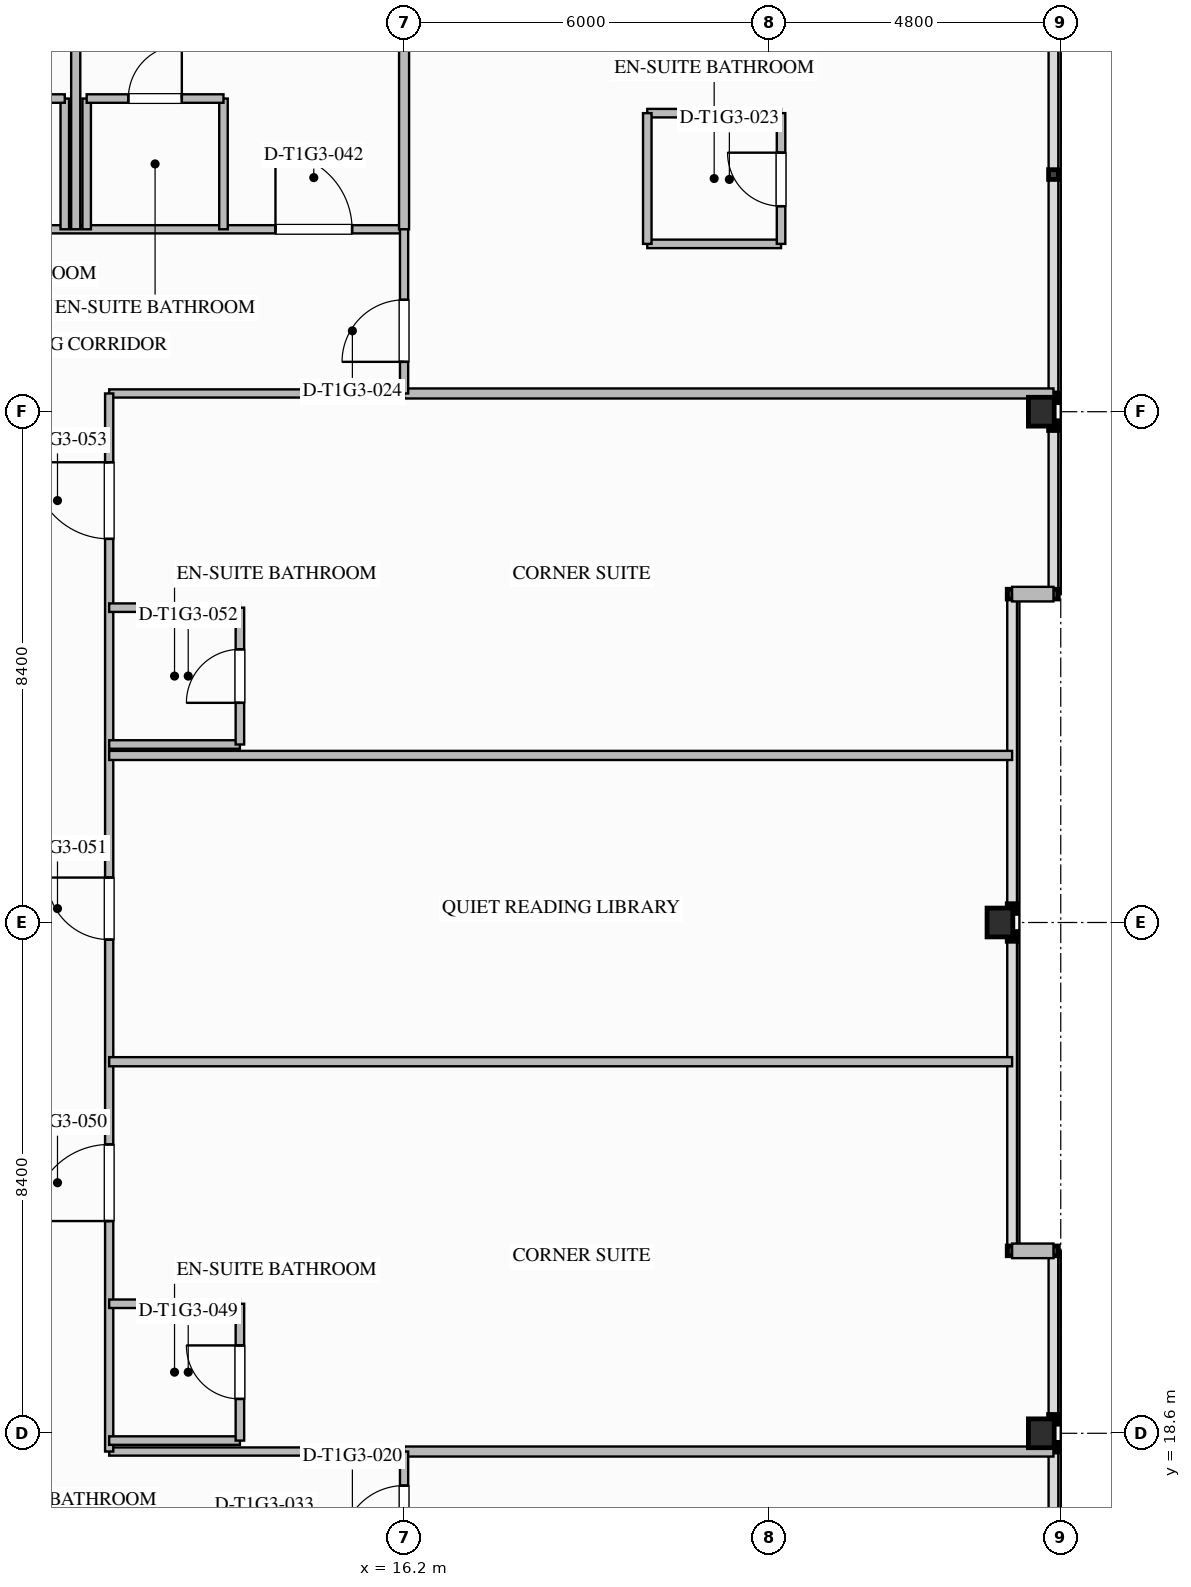
"""IFC4 building model, lengths in metres.
Left out: names, types, materials, properties, quantities, classifications, styles, units other than length and angle.
Written with IfcOpenShell. Run it as: python <this file> out.ifc"""

import sys

from ifc_helpers import new_model, si_unit, direction, frame, frame_2d, origin, origin_2d, place, context, subcontext, project, spatial, rectangle, i_section, extrude, element, fill, save


model = new_model("IFC4")
c1 = context("Model", 3, precision=1e-05, world=origin(), true_north=direction((0.0, 1.0)))
c2 = subcontext(c1, "Body", "Model", "MODEL_VIEW")
j1 = project(units=[si_unit("LENGTHUNIT", "METRE"), si_unit("PLANEANGLEUNIT", "RADIAN")], contexts=[c1])
p1 = place(None, origin())
s1 = spatial("IfcSite", under=j1, at=p1, CompositionType="ELEMENT")
p2 = place(p1, origin())
s2 = spatial("IfcBuilding", under=s1, at=p2, CompositionType="ELEMENT")
p3 = place(p2, frame((0.0, 0.0, 61.2)))
s3 = spatial("IfcBuildingStorey", under=s2, at=p3, CompositionType="ELEMENT", Elevation=61.2)
for number, where, z_axis, x_axis in (
    (1, (26.68, 18.6, 0.0), (0.0, 0.0, 1.0), (1.0, 0.0, 0.0)),
    (2, (26.0, 27.0, 0.0), (0.0, 0.0, 1.0), (1.0, 0.0, 0.0)),
    (3, (26.68, 35.4, 0.0), (0.0, 0.0, 1.0), (1.0, 0.0, 0.0)),
):
    element("IfcColumn", number, at=place(p3, frame(where, z_axis=z_axis, x_axis=x_axis)), inside=s3, PredefinedType="COLUMN", context=c2, shape_type="SweptSolid", body=[
        extrude(i_section(OverallWidth=0.424, OverallDepth=0.474, WebThickness=0.048, FlangeThickness=0.077, FilletRadius=0.03, at=origin_2d()), origin(), (0.0, 0.0, 1.0), 3.497),
    ])
for number, where, z_axis, x_axis in (
    (4, (26.88, 32.4, 0.0), (0.0, 0.0, 1.0), (-1.0, 0.0, 0.0)),
    (5, (26.2, 21.6, 0.0), (0.0, 0.0, 1.0), (1.0, 0.0, 0.0)),
):
    element("IfcWall", number, at=place(p3, frame(where, z_axis=z_axis, x_axis=x_axis)), inside=s3, PredefinedType="STANDARD", context=c2, shape_type="SweptSolid", body=[
        extrude(rectangle(XDim=0.68, YDim=0.24, at=frame_2d((0.34, 0.0))), origin(), (0.0, 0.0, 1.0), 3.24),
    ])
p4 = place(p3, frame((-16.2, 38.4, 0.0), z_axis=(0.0, 0.0, 1.0), x_axis=(1.0, 0.0, 0.0)))
e6 = element("IfcWall", 6, at=p4, inside=s3, PredefinedType="PARTITIONING", context=c2, shape_type="SweptSolid", body=[
    extrude(rectangle(XDim=32.4, YDim=0.135, at=frame_2d((16.2, 0.0))), origin(), (0.0, 0.0, 1.0), 3.24),
])
p5 = place(p4, frame((4.095, 0.0, 0.0)))
e7 = element("IfcOpeningElement", 7, at=p5, cuts=e6, PredefinedType="OPENING", context=c2, shape_type="SweptSolid", body=[
    extrude(rectangle(XDim=1.26, YDim=2.2, at=frame_2d((0.63, 1.1))), frame((0.0, 0.077, 0.0), z_axis=(0.0, -1.0, 0.0), x_axis=(1.0, 0.0, 0.0)), (0.0, 0.0, 1.0), 0.155),
])
p6 = place(p4, frame((7.875, 0.0, 0.0)))
e8 = element("IfcOpeningElement", 8, at=p6, cuts=e6, PredefinedType="OPENING", context=c2, shape_type="SweptSolid", body=[
    extrude(rectangle(XDim=1.26, YDim=2.2, at=frame_2d((0.63, 1.1))), frame((0.0, 0.077, 0.0), z_axis=(0.0, -1.0, 0.0), x_axis=(1.0, 0.0, 0.0)), (0.0, 0.0, 1.0), 0.155),
])
p7 = place(p4, frame((15.69, 0.0, 0.0)))
e9 = element("IfcOpeningElement", 9, at=p7, cuts=e6, PredefinedType="OPENING", context=c2, shape_type="SweptSolid", body=[
    extrude(rectangle(XDim=1.02, YDim=2.15, at=frame_2d((0.51, 1.075))), frame((0.0, 0.077, 0.0), z_axis=(0.0, -1.0, 0.0), x_axis=(1.0, 0.0, 0.0)), (0.0, 0.0, 1.0), 0.155),
])
p8 = place(p4, frame((21.645, 0.0, 0.0)))
e10 = element("IfcOpeningElement", 10, at=p8, cuts=e6, PredefinedType="OPENING", context=c2, shape_type="SweptSolid", body=[
    extrude(rectangle(XDim=1.26, YDim=2.2, at=frame_2d((0.63, 1.1))), frame((0.0, 0.077, 0.0), z_axis=(0.0, -1.0, 0.0), x_axis=(1.0, 0.0, 0.0)), (0.0, 0.0, 1.0), 0.155),
])
p9 = place(p4, frame((30.285, 0.0, 0.0)))
e11 = element("IfcOpeningElement", 11, at=p9, cuts=e6, PredefinedType="OPENING", context=c2, shape_type="SweptSolid", body=[
    extrude(rectangle(XDim=1.26, YDim=2.2, at=frame_2d((0.63, 1.1))), frame((0.0, 0.077, 0.0), z_axis=(0.0, -1.0, 0.0), x_axis=(1.0, 0.0, 0.0)), (0.0, 0.0, 1.0), 0.155),
])
for number, where, z_axis, x_axis in (
    (12, (11.35, 18.3, 0.0), (0.0, 0.0, 1.0), (1.0, 0.0, 0.0)),
    (13, (11.35, 35.7, 0.0), (0.0, 0.0, 1.0), (1.0, 0.0, 0.0)),
):
    element("IfcWall", number, at=place(p3, frame(where, z_axis=z_axis, x_axis=x_axis)), inside=s3, PredefinedType="PARTITIONING", context=c2, shape_type="SweptSolid", body=[
        extrude(rectangle(XDim=4.85, YDim=0.135, at=frame_2d((2.425, 0.0))), origin(), (0.0, 0.0, 1.0), 3.24),
    ])
p10 = place(p3, frame((11.35, 18.3, 0.0), z_axis=(0.0, 0.0, 1.0), x_axis=(0.0, 1.0, 0.0)))
e14 = element("IfcWall", 14, at=p10, inside=s3, PredefinedType="PARTITIONING", context=c2, shape_type="SweptSolid", body=[
    extrude(rectangle(XDim=17.4, YDim=0.135, at=frame_2d((8.7, 0.0))), origin(), (0.0, 0.0, 1.0), 3.24),
])
p11 = place(p10, frame((3.79, 0.0, 0.0)))
e15 = element("IfcOpeningElement", 15, at=p11, cuts=e14, PredefinedType="OPENING", context=c2, shape_type="SweptSolid", body=[
    extrude(rectangle(XDim=1.26, YDim=2.2, at=frame_2d((0.63, 1.1))), frame((0.0, 0.077, 0.0), z_axis=(0.0, -1.0, 0.0), x_axis=(1.0, 0.0, 0.0)), (0.0, 0.0, 1.0), 0.155),
])
p12 = place(p10, frame((8.419, 0.0, 0.0)))
e16 = element("IfcOpeningElement", 16, at=p12, cuts=e14, PredefinedType="OPENING", context=c2, shape_type="SweptSolid", body=[
    extrude(rectangle(XDim=1.02, YDim=2.15, at=frame_2d((0.51, 1.075))), frame((0.0, 0.077, 0.0), z_axis=(0.0, -1.0, 0.0), x_axis=(1.0, 0.0, 0.0)), (0.0, 0.0, 1.0), 0.155),
])
p13 = place(p10, frame((15.009, 0.0, 0.0)))
e17 = element("IfcOpeningElement", 17, at=p13, cuts=e14, PredefinedType="OPENING", context=c2, shape_type="SweptSolid", body=[
    extrude(rectangle(XDim=1.26, YDim=2.2, at=frame_2d((0.63, 1.1))), frame((0.0, 0.077, 0.0), z_axis=(0.0, -1.0, 0.0), x_axis=(1.0, 0.0, 0.0)), (0.0, 0.0, 1.0), 0.155),
])
p14 = place(p3, frame((16.2, 38.4, 0.0), z_axis=(0.0, 0.0, 1.0), x_axis=(0.0, 1.0, 0.0)))
e18 = element("IfcWall", 18, at=p14, inside=s3, PredefinedType="PARTITIONING", context=c2, shape_type="SweptSolid", body=[
    extrude(rectangle(XDim=15.48, YDim=0.165, at=frame_2d((7.74, 0.0))), origin(), (0.0, 0.0, 1.0), 2.452),
])
for number, where, z_axis, x_axis in (
    (19, (16.2, 18.3, 0.0), (0.0, 0.0, 1.0), (1.0, 0.0, 0.0)),
    (20, (16.2, 35.7, 0.0), (0.0, 0.0, 1.0), (1.0, 0.0, 0.0)),
):
    element("IfcWall", number, at=place(p3, frame(where, z_axis=z_axis, x_axis=x_axis)), inside=s3, PredefinedType="PARTITIONING", context=c2, shape_type="SweptSolid", body=[
        extrude(rectangle(XDim=10.68, YDim=0.165, at=frame_2d((5.34, 0.0))), origin(), (0.0, 0.0, 1.0), 2.452),
    ])
p15 = place(p3, frame((16.2, 16.2, 0.0), z_axis=(0.0, 0.0, 1.0), x_axis=(0.0, 1.0, 0.0)))
e21 = element("IfcWall", 21, at=p15, inside=s3, PredefinedType="PARTITIONING", context=c2, shape_type="SweptSolid", body=[
    extrude(rectangle(XDim=2.1, YDim=0.135, at=frame_2d((1.05, 0.0))), origin(), (0.0, 0.0, 1.0), 2.452),
])
p16 = place(p15, frame((0.52, 0.0, 0.0)))
e22 = element("IfcOpeningElement", 22, at=p16, cuts=e21, PredefinedType="OPENING", context=c2, shape_type="SweptSolid", body=[
    extrude(rectangle(XDim=1.02, YDim=2.15, at=frame_2d((0.51, 1.075))), frame((0.0, 0.077, 0.0), z_axis=(0.0, -1.0, 0.0), x_axis=(1.0, 0.0, 0.0)), (0.0, 0.0, 1.0), 0.155),
])
p17 = place(p3, frame((16.2, 35.7, 0.0), z_axis=(0.0, 0.0, 1.0), x_axis=(0.0, 1.0, 0.0)))
e23 = element("IfcWall", 23, at=p17, inside=s3, PredefinedType="PARTITIONING", context=c2, shape_type="SweptSolid", body=[
    extrude(rectangle(XDim=2.7, YDim=0.135, at=frame_2d((1.35, 0.0))), origin(), (0.0, 0.0, 1.0), 2.452),
])
p18 = place(p17, frame((0.52, 0.0, 0.0)))
e24 = element("IfcOpeningElement", 24, at=p18, cuts=e23, PredefinedType="OPENING", context=c2, shape_type="SweptSolid", body=[
    extrude(rectangle(XDim=1.02, YDim=2.15, at=frame_2d((0.51, 1.075))), frame((0.0, 0.077, 0.0), z_axis=(0.0, -1.0, 0.0), x_axis=(1.0, 0.0, 0.0)), (0.0, 0.0, 1.0), 0.155),
])
for number, where, z_axis, x_axis in (
    (25, (20.2, 38.16, 0.0), (0.0, 0.0, 1.0), (1.0, 0.0, 0.0)),
    (26, (20.2, 40.31, 0.0), (0.0, 0.0, 1.0), (1.0, 0.0, 0.0)),
):
    element("IfcWall", number, at=place(p3, frame(where, z_axis=z_axis, x_axis=x_axis)), inside=s3, PredefinedType="PLUMBINGWALL", context=c2, shape_type="SweptSolid", body=[
        extrude(rectangle(XDim=2.2, YDim=0.14, at=frame_2d((1.1, 0.0))), origin(), (0.0, 0.0, 1.0), 3.24),
    ])
p19 = place(p3, frame((20.2, 38.16, 0.0), z_axis=(0.0, 0.0, 1.0), x_axis=(0.0, 1.0, 0.0)))
e27 = element("IfcWall", 27, at=p19, inside=s3, PredefinedType="PLUMBINGWALL", context=c2, shape_type="SweptSolid", body=[
    extrude(rectangle(XDim=2.15, YDim=0.14, at=frame_2d((1.075, 0.0))), origin(), (0.0, 0.0, 1.0), 3.24),
])
p20 = place(p3, frame((22.4, 38.16, 0.0), z_axis=(0.0, 0.0, 1.0), x_axis=(0.0, 1.0, 0.0)))
e28 = element("IfcWall", 28, at=p20, inside=s3, PredefinedType="PLUMBINGWALL", context=c2, shape_type="SweptSolid", body=[
    extrude(rectangle(XDim=2.15, YDim=0.14, at=frame_2d((1.075, 0.0))), origin(), (0.0, 0.0, 1.0), 3.24),
])
p21 = place(p20, frame((0.62, 0.0, 0.0)))
e29 = element("IfcOpeningElement", 29, at=p21, cuts=e28, PredefinedType="OPENING", context=c2, shape_type="SweptSolid", body=[
    extrude(rectangle(XDim=0.88, YDim=2.1, at=frame_2d((0.44, 1.05))), frame((0.0, 0.08, 0.0), z_axis=(0.0, -1.0, 0.0), x_axis=(1.0, 0.0, 0.0)), (0.0, 0.0, 1.0), 0.16),
])
p22 = place(p3, frame((10.62, 38.4, 0.0), z_axis=(0.0, 0.0, 1.0), x_axis=(0.0, 1.0, 0.0)))
e30 = element("IfcWall", 30, at=p22, inside=s3, PredefinedType="PLUMBINGWALL", context=c2, shape_type="SweptSolid", body=[
    extrude(rectangle(XDim=2.15, YDim=0.14, at=frame_2d((1.075, 0.0))), origin(), (0.0, 0.0, 1.0), 3.24),
])
p23 = place(p3, frame((8.37, 40.55, 0.0), z_axis=(0.0, 0.0, 1.0), x_axis=(1.0, 0.0, 0.0)))
e31 = element("IfcWall", 31, at=p23, inside=s3, PredefinedType="PLUMBINGWALL", context=c2, shape_type="SweptSolid", body=[
    extrude(rectangle(XDim=2.25, YDim=0.14, at=frame_2d((1.125, 0.0))), origin(), (0.0, 0.0, 1.0), 3.24),
])
p24 = place(p23, frame((0.685, 0.0, 0.0)))
e32 = element("IfcOpeningElement", 32, at=p24, cuts=e31, PredefinedType="OPENING", context=c2, shape_type="SweptSolid", body=[
    extrude(rectangle(XDim=0.88, YDim=2.1, at=frame_2d((0.44, 1.05))), frame((0.0, 0.08, 0.0), z_axis=(0.0, -1.0, 0.0), x_axis=(1.0, 0.0, 0.0)), (0.0, 0.0, 1.0), 0.16),
])
p25 = place(p3, frame((10.8, 38.4, 0.0), z_axis=(0.0, 0.0, 1.0), x_axis=(0.0, 1.0, 0.0)))
e33 = element("IfcWall", 33, at=p25, inside=s3, PredefinedType="PARTITIONING", context=c2, shape_type="SweptSolid", body=[
    extrude(rectangle(XDim=15.48, YDim=0.15, at=frame_2d((7.74, 0.0))), origin(), (0.0, 0.0, 1.0), 3.24),
])
for number, where, z_axis, x_axis in (
    (34, (10.98, 38.4, 0.0), (0.0, 0.0, 1.0), (0.0, 1.0, 0.0)),
    (35, (13.23, 38.4, 0.0), (0.0, 0.0, 1.0), (0.0, 1.0, 0.0)),
):
    element("IfcWall", number, at=place(p3, frame(where, z_axis=z_axis, x_axis=x_axis)), inside=s3, PredefinedType="PLUMBINGWALL", context=c2, shape_type="SweptSolid", body=[
        extrude(rectangle(XDim=2.15, YDim=0.14, at=frame_2d((1.075, 0.0))), origin(), (0.0, 0.0, 1.0), 3.24),
    ])
p26 = place(p3, frame((10.98, 40.55, 0.0), z_axis=(0.0, 0.0, 1.0), x_axis=(1.0, 0.0, 0.0)))
e36 = element("IfcWall", 36, at=p26, inside=s3, PredefinedType="PLUMBINGWALL", context=c2, shape_type="SweptSolid", body=[
    extrude(rectangle(XDim=2.25, YDim=0.14, at=frame_2d((1.125, 0.0))), origin(), (0.0, 0.0, 1.0), 3.24),
])
p27 = place(p26, frame((0.685, 0.0, 0.0)))
e37 = element("IfcOpeningElement", 37, at=p27, cuts=e36, PredefinedType="OPENING", context=c2, shape_type="SweptSolid", body=[
    extrude(rectangle(XDim=0.88, YDim=2.1, at=frame_2d((0.44, 1.05))), frame((0.0, 0.08, 0.0), z_axis=(0.0, -1.0, 0.0), x_axis=(1.0, 0.0, 0.0)), (0.0, 0.0, 1.0), 0.16),
])
p28 = place(p3, frame((11.35, 18.48, 0.0), z_axis=(0.0, 0.0, 1.0), x_axis=(1.0, 0.0, 0.0)))
e38 = element("IfcWall", 38, at=p28, inside=s3, PredefinedType="PLUMBINGWALL", context=c2, shape_type="SweptSolid", body=[
    extrude(rectangle(XDim=2.15, YDim=0.14, at=frame_2d((1.075, 0.0))), origin(), (0.0, 0.0, 1.0), 2.617),
])
p29 = place(p3, frame((11.35, 20.73, 0.0), z_axis=(0.0, 0.0, 1.0), x_axis=(1.0, 0.0, 0.0)))
e39 = element("IfcWall", 39, at=p29, inside=s3, PredefinedType="PLUMBINGWALL", context=c2, shape_type="SweptSolid", body=[
    extrude(rectangle(XDim=2.15, YDim=0.14, at=frame_2d((1.075, 0.0))), origin(), (0.0, 0.0, 1.0), 3.24),
])
p30 = place(p3, frame((13.5, 18.48, 0.0), z_axis=(0.0, 0.0, 1.0), x_axis=(0.0, 1.0, 0.0)))
e40 = element("IfcWall", 40, at=p30, inside=s3, PredefinedType="PLUMBINGWALL", context=c2, shape_type="SweptSolid", body=[
    extrude(rectangle(XDim=2.25, YDim=0.14, at=frame_2d((1.125, 0.0))), origin(), (0.0, 0.0, 1.0), 3.24),
])
p31 = place(p30, frame((0.685, 0.0, 0.0)))
e41 = element("IfcOpeningElement", 41, at=p31, cuts=e40, PredefinedType="OPENING", context=c2, shape_type="SweptSolid", body=[
    extrude(rectangle(XDim=0.88, YDim=2.1, at=frame_2d((0.44, 1.05))), frame((0.0, 0.08, 0.0), z_axis=(0.0, -1.0, 0.0), x_axis=(1.0, 0.0, 0.0)), (0.0, 0.0, 1.0), 0.16),
])
for number, where, z_axis, x_axis in (
    (42, (11.35, 24.71, 0.0), (0.0, 0.0, 1.0), (1.0, 0.0, 0.0)),
    (43, (11.35, 29.747, 0.0), (0.0, 0.0, 1.0), (1.0, 0.0, 0.0)),
):
    element("IfcWall", number, at=place(p3, frame(where, z_axis=z_axis, x_axis=x_axis)), inside=s3, PredefinedType="PARTITIONING", context=c2, shape_type="SweptSolid", body=[
        extrude(rectangle(XDim=14.85, YDim=0.15, at=frame_2d((7.425, 0.0))), origin(), (0.0, 0.0, 1.0), 3.24),
    ])
for number, where, z_axis, x_axis in (
    (44, (11.35, 29.927, 0.0), (0.0, 0.0, 1.0), (1.0, 0.0, 0.0)),
    (45, (11.35, 32.177, 0.0), (0.0, 0.0, 1.0), (1.0, 0.0, 0.0)),
):
    element("IfcWall", number, at=place(p3, frame(where, z_axis=z_axis, x_axis=x_axis)), inside=s3, PredefinedType="PLUMBINGWALL", context=c2, shape_type="SweptSolid", body=[
        extrude(rectangle(XDim=2.15, YDim=0.14, at=frame_2d((1.075, 0.0))), origin(), (0.0, 0.0, 1.0), 3.24),
    ])
p32 = place(p3, frame((13.5, 29.927, 0.0), z_axis=(0.0, 0.0, 1.0), x_axis=(0.0, 1.0, 0.0)))
e46 = element("IfcWall", 46, at=p32, inside=s3, PredefinedType="PLUMBINGWALL", context=c2, shape_type="SweptSolid", body=[
    extrude(rectangle(XDim=2.25, YDim=0.14, at=frame_2d((1.125, 0.0))), origin(), (0.0, 0.0, 1.0), 3.24),
])
p33 = place(p32, frame((0.685, 0.0, 0.0)))
e47 = element("IfcOpeningElement", 47, at=p33, cuts=e46, PredefinedType="OPENING", context=c2, shape_type="SweptSolid", body=[
    extrude(rectangle(XDim=0.88, YDim=2.1, at=frame_2d((0.44, 1.05))), frame((0.0, 0.08, 0.0), z_axis=(0.0, -1.0, 0.0), x_axis=(1.0, 0.0, 0.0)), (0.0, 0.0, 1.0), 0.16),
])
p34 = place(p16, origin())
e48 = element("IfcDoor", 48, at=p34, inside=s3, OperationType="SINGLE_SWING_LEFT", PredefinedType="DOOR", context=c2, shape_type="SweptSolid", body=[
    extrude(rectangle(XDim=1.02, YDim=2.15, at=frame_2d((0.51, 1.075))), frame((0.0, 0.025, 0.0), z_axis=(0.0, -1.0, 0.0), x_axis=(1.0, 0.0, 0.0)), (0.0, 0.0, 1.0), 0.05),
])
fill(e22, e48)
p35 = place(p21, origin())
e49 = element("IfcDoor", 49, at=p35, inside=s3, OperationType="SINGLE_SWING_RIGHT", PredefinedType="DOOR", context=c2, shape_type="SweptSolid", body=[
    extrude(rectangle(XDim=0.88, YDim=2.1, at=frame_2d((0.44, 1.05))), frame((0.0, 0.025, 0.0), z_axis=(0.0, -1.0, 0.0), x_axis=(1.0, 0.0, 0.0)), (0.0, 0.0, 1.0), 0.05),
])
fill(e29, e49)
p36 = place(p18, origin())
e50 = element("IfcDoor", 50, at=p36, inside=s3, OperationType="SINGLE_SWING_LEFT", PredefinedType="DOOR", context=c2, shape_type="SweptSolid", body=[
    extrude(rectangle(XDim=1.02, YDim=2.15, at=frame_2d((0.51, 1.075))), frame((0.0, 0.025, 0.0), z_axis=(0.0, -1.0, 0.0), x_axis=(1.0, 0.0, 0.0)), (0.0, 0.0, 1.0), 0.05),
])
fill(e24, e50)
p37 = place(p27, origin())
e51 = element("IfcDoor", 51, at=p37, inside=s3, OperationType="SINGLE_SWING_RIGHT", PredefinedType="DOOR", context=c2, shape_type="SweptSolid", body=[
    extrude(rectangle(XDim=0.88, YDim=2.1, at=frame_2d((0.44, 1.05))), frame((0.0, 0.025, 0.0), z_axis=(0.0, -1.0, 0.0), x_axis=(1.0, 0.0, 0.0)), (0.0, 0.0, 1.0), 0.05),
])
fill(e37, e51)
p38 = place(p9, origin())
e52 = element("IfcDoor", 52, at=p38, inside=s3, OperationType="SINGLE_SWING_LEFT", PredefinedType="DOOR", context=c2, shape_type="SweptSolid", body=[
    extrude(rectangle(XDim=1.26, YDim=2.2, at=frame_2d((0.63, 1.1))), frame((0.0, 0.025, 0.0), z_axis=(0.0, -1.0, 0.0), x_axis=(1.0, 0.0, 0.0)), (0.0, 0.0, 1.0), 0.05),
])
fill(e11, e52)
p39 = place(p31, origin())
e53 = element("IfcDoor", 53, at=p39, inside=s3, OperationType="SINGLE_SWING_RIGHT", PredefinedType="DOOR", context=c2, shape_type="SweptSolid", body=[
    extrude(rectangle(XDim=0.88, YDim=2.1, at=frame_2d((0.44, 1.05))), frame((0.0, 0.025, 0.0), z_axis=(0.0, -1.0, 0.0), x_axis=(1.0, 0.0, 0.0)), (0.0, 0.0, 1.0), 0.05),
])
fill(e41, e53)
p40 = place(p11, origin())
e54 = element("IfcDoor", 54, at=p40, inside=s3, OperationType="SINGLE_SWING_LEFT", PredefinedType="DOOR", context=c2, shape_type="SweptSolid", body=[
    extrude(rectangle(XDim=1.26, YDim=2.2, at=frame_2d((0.63, 1.1))), frame((0.0, 0.025, 0.0), z_axis=(0.0, -1.0, 0.0), x_axis=(1.0, 0.0, 0.0)), (0.0, 0.0, 1.0), 0.05),
])
fill(e15, e54)
p41 = place(p12, origin())
e55 = element("IfcDoor", 55, at=p41, inside=s3, OperationType="SINGLE_SWING_RIGHT", PredefinedType="DOOR", context=c2, shape_type="SweptSolid", body=[
    extrude(rectangle(XDim=1.02, YDim=2.15, at=frame_2d((0.51, 1.075))), frame((0.0, 0.025, 0.0), z_axis=(0.0, -1.0, 0.0), x_axis=(1.0, 0.0, 0.0)), (0.0, 0.0, 1.0), 0.05),
])
fill(e16, e55)
p42 = place(p33, origin())
e56 = element("IfcDoor", 56, at=p42, inside=s3, OperationType="SINGLE_SWING_LEFT", PredefinedType="DOOR", context=c2, shape_type="SweptSolid", body=[
    extrude(rectangle(XDim=0.88, YDim=2.1, at=frame_2d((0.44, 1.05))), frame((0.0, 0.025, 0.0), z_axis=(0.0, -1.0, 0.0), x_axis=(1.0, 0.0, 0.0)), (0.0, 0.0, 1.0), 0.05),
])
fill(e47, e56)
p43 = place(p13, origin())
e57 = element("IfcDoor", 57, at=p43, inside=s3, OperationType="SINGLE_SWING_RIGHT", PredefinedType="DOOR", context=c2, shape_type="SweptSolid", body=[
    extrude(rectangle(XDim=1.26, YDim=2.2, at=frame_2d((0.63, 1.1))), frame((0.0, 0.025, 0.0), z_axis=(0.0, -1.0, 0.0), x_axis=(1.0, 0.0, 0.0)), (0.0, 0.0, 1.0), 0.05),
])
fill(e17, e57)
save(model, sys.argv[1])
